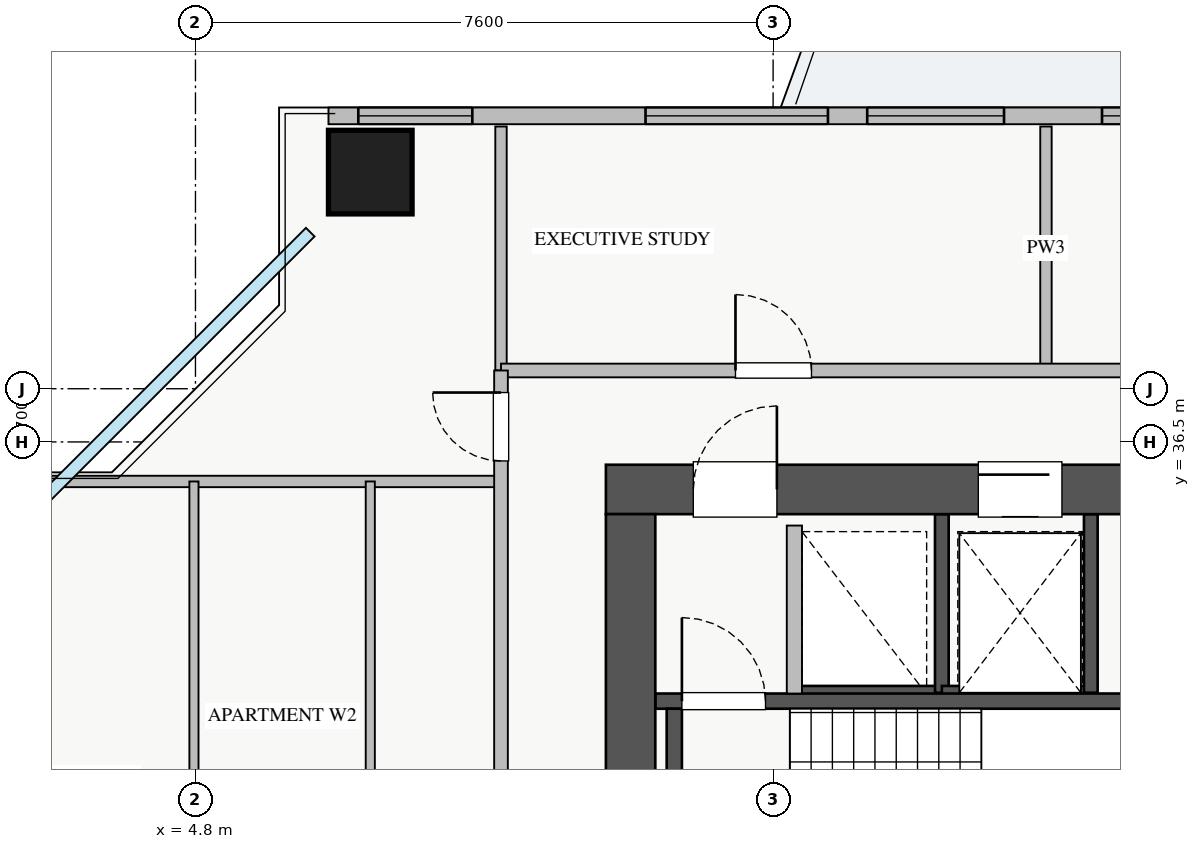
"""IFC4 building model, lengths in metres.
Left out: names, types, materials, properties, quantities, classifications, styles, units other than length and angle.
Written with IfcOpenShell. Run it as: python <this file> out.ifc"""

import sys

from ifc_helpers import new_model, si_unit, direction, frame, frame_2d, origin, origin_2d, place, context, subcontext, project, spatial, rectangle, extrude, source, transform, mapped, element, fill, save


model = new_model("IFC4")
c1 = context("Model", 3, precision=1e-05, world=origin(), true_north=direction((0.0, 1.0)))
c2 = subcontext(c1, "Body", "Model", "MODEL_VIEW")
j1 = project(units=[si_unit("LENGTHUNIT", "METRE"), si_unit("PLANEANGLEUNIT", "RADIAN")], contexts=[c1])
p1 = place(None, origin())
s1 = spatial("IfcSite", under=j1, at=p1, CompositionType="ELEMENT")
p2 = place(p1, origin())
s2 = spatial("IfcBuilding", under=s1, at=p2, CompositionType="ELEMENT")
p3 = place(p2, frame((0.0, 0.0, 136.0)))
s3 = spatial("IfcBuildingStorey", under=s2, at=p3, CompositionType="ELEMENT", Elevation=136.0)
p4 = place(p3, frame((12.68, 33.2, 0.0), z_axis=(0.0, 0.0, 1.0), x_axis=(1.0, 0.0, 0.0)))
e1 = element("IfcWall", 1, at=p4, inside=s3, PredefinedType="SHEAR", context=c2, shape_type="SweptSolid", body=[
    extrude(rectangle(XDim=1.94, YDim=0.18, at=frame_2d((0.97, 0.0))), origin(), (0.0, 0.0, 1.0), 3.03),
])
p5 = place(p3, frame((14.62, 33.2, 0.0), z_axis=(0.0, 0.0, 1.0), x_axis=(0.0, 1.0, 0.0)))
e2 = element("IfcWall", 2, at=p5, inside=s3, PredefinedType="SHEAR", context=c2, shape_type="SweptSolid", body=[
    extrude(rectangle(XDim=2.35, YDim=0.18, at=frame_2d((1.175, 0.0))), origin(), (0.0, 0.0, 1.0), 3.03),
])
p6 = place(p3, frame((14.62, 33.2, 0.0), z_axis=(0.0, 0.0, 1.0), x_axis=(1.0, 0.0, 0.0)))
e3 = element("IfcWall", 3, at=p6, inside=s3, PredefinedType="SHEAR", context=c2, shape_type="SweptSolid", body=[
    extrude(rectangle(XDim=1.96, YDim=0.18, at=frame_2d((0.98, 0.0))), origin(), (0.0, 0.0, 1.0), 3.03),
])
p7 = place(p3, frame((16.58, 33.2, 0.0), z_axis=(0.0, 0.0, 1.0), x_axis=(0.0, 1.0, 0.0)))
e4 = element("IfcWall", 4, at=p7, inside=s3, PredefinedType="SHEAR", context=c2, shape_type="SweptSolid", body=[
    extrude(rectangle(XDim=2.35, YDim=0.18, at=frame_2d((1.175, 0.0))), origin(), (0.0, 0.0, 1.0), 3.03),
])
p8 = place(p3, frame((10.85, 33.09, 0.0), z_axis=(0.0, 0.0, 1.0), x_axis=(1.0, 0.0, 0.0)))
e5 = element("IfcWall", 5, at=p8, inside=s3, PredefinedType="SHEAR", context=c2, shape_type="SweptSolid", body=[
    extrude(rectangle(XDim=7.3, YDim=0.2, at=frame_2d((3.65, 0.0))), origin(), (0.0, 0.0, 1.0), 3.25),
])
p9 = place(p8, frame((0.35, 0.0, 0.0)))
e6 = element("IfcOpeningElement", 6, at=p9, cuts=e5, PredefinedType="OPENING", context=c2, shape_type="SweptSolid", body=[
    extrude(rectangle(XDim=1.1, YDim=2.05, at=frame_2d((0.55, 1.025))), frame((0.0, 0.11, 0.0), z_axis=(0.0, -1.0, 0.0), x_axis=(1.0, 0.0, 0.0)), (0.0, 0.0, 1.0), 0.22),
])
p10 = place(p3, frame((11.1, 30.05, 0.0), z_axis=(0.0, 0.0, 1.0), x_axis=(0.0, 1.0, 0.0)))
e7 = element("IfcWall", 7, at=p10, inside=s3, PredefinedType="SHEAR", context=c2, shape_type="SweptSolid", body=[
    extrude(rectangle(XDim=2.94, YDim=0.2, at=frame_2d((1.47, 0.0))), origin(), (0.0, 0.0, 1.0), 3.25),
])
p11 = place(p3, frame((10.2, 35.875, 0.0), z_axis=(0.0, 0.0, 1.0), x_axis=(1.0, 0.0, 0.0)))
e8 = element("IfcWall", 8, at=p11, inside=s3, PredefinedType="SHEAR", context=c2, shape_type="SweptSolid", body=[
    extrude(rectangle(XDim=17.6, YDim=0.65, at=frame_2d((8.8, 0.0))), origin(), (0.0, 0.0, 1.0), 3.25),
])
p12 = place(p11, frame((1.15, 0.0, 0.0)))
e9 = element("IfcOpeningElement", 9, at=p12, cuts=e8, PredefinedType="OPENING", context=c2, shape_type="SweptSolid", body=[
    extrude(rectangle(XDim=1.1, YDim=2.05, at=frame_2d((0.55, 1.025))), frame((0.0, 0.335, 0.0), z_axis=(0.0, -1.0, 0.0), x_axis=(1.0, 0.0, 0.0)), (0.0, 0.0, 1.0), 0.67),
])
p13 = place(p11, frame((8.3, 0.0, 0.0)))
e10 = element("IfcOpeningElement", 10, at=p13, cuts=e8, PredefinedType="OPENING", context=c2, shape_type="SweptSolid", body=[
    extrude(rectangle(XDim=1.1, YDim=2.05, at=frame_2d((0.55, 1.025))), frame((0.0, 0.335, 0.0), z_axis=(0.0, -1.0, 0.0), x_axis=(1.0, 0.0, 0.0)), (0.0, 0.0, 1.0), 0.67),
])
p14 = place(p11, frame((4.9, 0.0, 0.0)))
e11 = element("IfcOpeningElement", 11, at=p14, cuts=e8, PredefinedType="OPENING", context=c2, shape_type="SweptSolid", body=[
    extrude(rectangle(XDim=1.1, YDim=2.05, at=frame_2d((0.55, 1.025))), frame((0.0, 0.335, 0.0), z_axis=(0.0, -1.0, 0.0), x_axis=(1.0, 0.0, 0.0)), (0.0, 0.0, 1.0), 0.67),
])
p15 = place(p11, frame((14.74, 0.0, 0.0)))
e12 = element("IfcOpeningElement", 12, at=p15, cuts=e8, PredefinedType="OPENING", context=c2, shape_type="SweptSolid", body=[
    extrude(rectangle(XDim=1.0, YDim=2.05, at=frame_2d((0.5, 1.025))), frame((0.0, 0.335, 0.0), z_axis=(0.0, -1.0, 0.0), x_axis=(1.0, 0.0, 0.0)), (0.0, 0.0, 1.0), 0.67),
])
p16 = place(p11, frame((10.175, 0.0, 0.0)))
e13 = element("IfcOpeningElement", 13, at=p16, cuts=e8, PredefinedType="OPENING", context=c2, shape_type="SweptSolid", body=[
    extrude(rectangle(XDim=1.0, YDim=2.05, at=frame_2d((0.5, 1.025))), frame((0.0, 0.335, 0.0), z_axis=(0.0, -1.0, 0.0), x_axis=(1.0, 0.0, 0.0)), (0.0, 0.0, 1.0), 0.67),
])
p17 = place(p11, frame((12.625, 0.0, 0.0)))
e14 = element("IfcOpeningElement", 14, at=p17, cuts=e8, PredefinedType="OPENING", context=c2, shape_type="SweptSolid", body=[
    extrude(rectangle(XDim=1.0, YDim=2.05, at=frame_2d((0.5, 1.025))), frame((0.0, 0.335, 0.0), z_axis=(0.0, -1.0, 0.0), x_axis=(1.0, 0.0, 0.0)), (0.0, 0.0, 1.0), 0.67),
])
p18 = place(p3, frame((10.525, 29.65, 0.0), z_axis=(0.0, 0.0, 1.0), x_axis=(0.0, 1.0, 0.0)))
e15 = element("IfcWall", 15, at=p18, inside=s3, PredefinedType="SHEAR", context=c2, shape_type="SweptSolid", body=[
    extrude(rectangle(XDim=5.9, YDim=0.65, at=frame_2d((2.95, 0.0))), origin(), (0.0, 0.0, 1.0), 3.25),
])
m1 = source(origin(), c2, "Body", "SweptSolid", [
    extrude(rectangle(XDim=1.1, YDim=1.1, at=origin_2d()), origin(), (0.0, 0.0, 1.0), 3.25),
])
p19 = place(p3, frame((7.1, 40.05, 0.0), z_axis=(0.0, 0.0, 1.0), x_axis=(1.0, 0.0, 0.0)))
e16 = element("IfcColumn", 16, at=p19, inside=s3, PredefinedType="COLUMN", context=c2, shape_type="MappedRepresentation", body=[
    mapped(m1, transform((0.0, 0.0, 0.0), x_axis=(1.0, 0.0, 0.0), y_axis=(0.0, 1.0, 0.0), z_axis=(0.0, 0.0, 1.0), scale=1.0)),
])
p20 = place(p3, frame((6.55, 40.79, 0.0), z_axis=(0.0, 0.0, 1.0), x_axis=(1.0, 0.0, 0.0)))
e17 = element("IfcWall", 17, at=p20, inside=s3, PredefinedType="STANDARD", context=c2, shape_type="SweptSolid", body=[
    extrude(rectangle(XDim=24.9, YDim=0.22, at=frame_2d((12.45, 0.0))), origin(), (0.0, 0.0, 1.0), 2.57),
])
p21 = place(p20, frame((13.3, 0.0, 0.0)))
e18 = element("IfcOpeningElement", 18, at=p21, cuts=e17, PredefinedType="OPENING", context=c2, shape_type="SweptSolid", body=[
    extrude(rectangle(XDim=1.2, YDim=2.1, at=frame_2d((0.6, 1.05))), frame((0.0, 0.12, 0.0), z_axis=(0.0, -1.0, 0.0), x_axis=(1.0, 0.0, 0.0)), (0.0, 0.0, 1.0), 0.24),
])
p22 = place(p20, frame((0.393, 0.0, 0.9)))
e19 = element("IfcOpeningElement", 19, at=p22, cuts=e17, PredefinedType="OPENING", context=c2, shape_type="SweptSolid", body=[
    extrude(rectangle(XDim=1.5, YDim=1.5, at=frame_2d((0.75, 0.75))), frame((0.0, 0.12, 0.0), z_axis=(0.0, -1.0, 0.0), x_axis=(1.0, 0.0, 0.0)), (0.0, 0.0, 1.0), 0.24),
])
p23 = place(p20, frame((7.088, 0.0, 0.9)))
e20 = element("IfcOpeningElement", 20, at=p23, cuts=e17, PredefinedType="OPENING", context=c2, shape_type="SweptSolid", body=[
    extrude(rectangle(XDim=1.8, YDim=1.5, at=frame_2d((0.9, 0.75))), frame((0.0, 0.12, 0.0), z_axis=(0.0, -1.0, 0.0), x_axis=(1.0, 0.0, 0.0)), (0.0, 0.0, 1.0), 0.24),
])
p24 = place(p20, frame((14.813, 0.0, 0.9)))
e21 = element("IfcOpeningElement", 21, at=p24, cuts=e17, PredefinedType="OPENING", context=c2, shape_type="SweptSolid", body=[
    extrude(rectangle(XDim=1.5, YDim=1.45, at=frame_2d((0.75, 0.725))), frame((0.0, 0.12, 0.0), z_axis=(0.0, -1.0, 0.0), x_axis=(1.0, 0.0, 0.0)), (0.0, 0.0, 1.0), 0.24),
])
p25 = place(p20, frame((20.738, 0.0, 0.9)))
e22 = element("IfcOpeningElement", 22, at=p25, cuts=e17, PredefinedType="OPENING", context=c2, shape_type="SweptSolid", body=[
    extrude(rectangle(XDim=2.1, YDim=1.48, at=frame_2d((1.05, 0.74))), frame((0.0, 0.12, 0.0), z_axis=(0.0, -1.0, 0.0), x_axis=(1.0, 0.0, 0.0)), (0.0, 0.0, 1.0), 0.24),
])
p26 = place(p20, frame((4.171, 0.0, 0.9)))
e23 = element("IfcOpeningElement", 23, at=p26, cuts=e17, PredefinedType="OPENING", context=c2, shape_type="SweptSolid", body=[
    extrude(rectangle(XDim=2.4, YDim=1.5, at=frame_2d((1.2, 0.75))), frame((0.0, 0.12, 0.0), z_axis=(0.0, -1.0, 0.0), x_axis=(1.0, 0.0, 0.0)), (0.0, 0.0, 1.0), 0.24),
])
p27 = place(p20, frame((10.177, 0.0, 0.9)))
e24 = element("IfcOpeningElement", 24, at=p27, cuts=e17, PredefinedType="OPENING", context=c2, shape_type="SweptSolid", body=[
    extrude(rectangle(XDim=2.4, YDim=1.5, at=frame_2d((1.2, 0.75))), frame((0.0, 0.12, 0.0), z_axis=(0.0, -1.0, 0.0), x_axis=(1.0, 0.0, 0.0)), (0.0, 0.0, 1.0), 0.24),
])
p28 = place(p3, frame((12.68, 33.19, 0.0), z_axis=(0.0, 0.0, 1.0), x_axis=(0.0, 1.0, 0.0)))
e25 = element("IfcWall", 25, at=p28, inside=s3, PredefinedType="PARTITIONING", context=c2, shape_type="SweptSolid", body=[
    extrude(rectangle(XDim=2.21, YDim=0.2, at=frame_2d((1.105, 0.0))), origin(), (0.0, 0.0, 1.0), 3.03),
])
p29 = place(p3, frame((15.99, 37.44, 0.0), z_axis=(0.0, 0.0, 1.0), x_axis=(0.0, 1.0, 0.0)))
e26 = element("IfcWall", 26, at=p29, inside=s3, PredefinedType="PARTITIONING", context=c2, shape_type="SweptSolid", body=[
    extrude(rectangle(XDim=3.21, YDim=0.15, at=frame_2d((1.605, 0.0))), origin(), (0.0, 0.0, 1.0), 2.775),
])
p30 = place(p3, frame((8.82, 37.44, 0.0), z_axis=(0.0, 0.0, 1.0), x_axis=(0.0, 1.0, 0.0)))
e27 = element("IfcWall", 27, at=p30, inside=s3, PredefinedType="PARTITIONING", context=c2, shape_type="SweptSolid", body=[
    extrude(rectangle(XDim=3.21, YDim=0.15, at=frame_2d((1.605, 0.0))), origin(), (0.0, 0.0, 1.0), 3.03),
])
p31 = place(p3, frame((8.82, 37.44, 0.0), z_axis=(0.0, 0.0, 1.0), x_axis=(1.0, 0.0, 0.0)))
e28 = element("IfcWall", 28, at=p31, inside=s3, PredefinedType="PARTITIONING", context=c2, shape_type="SweptSolid", body=[
    extrude(rectangle(XDim=23.58, YDim=0.18, at=frame_2d((11.79, 0.0))), origin(), (0.0, 0.0, 1.0), 3.03),
])
p32 = place(p31, frame((3.085, 0.0, 0.0)))
e29 = element("IfcOpeningElement", 29, at=p32, cuts=e28, PredefinedType="OPENING", context=c2, shape_type="SweptSolid", body=[
    extrude(rectangle(XDim=1.0, YDim=2.05, at=frame_2d((0.5, 1.025))), frame((0.0, 0.1, 0.0), z_axis=(0.0, -1.0, 0.0), x_axis=(1.0, 0.0, 0.0)), (0.0, 0.0, 1.0), 0.2),
])
p33 = place(p31, frame((10.805, 0.0, 0.0)))
e30 = element("IfcOpeningElement", 30, at=p33, cuts=e28, PredefinedType="OPENING", context=c2, shape_type="SweptSolid", body=[
    extrude(rectangle(XDim=1.0, YDim=2.05, at=frame_2d((0.5, 1.025))), frame((0.0, 0.1, 0.0), z_axis=(0.0, -1.0, 0.0), x_axis=(1.0, 0.0, 0.0)), (0.0, 0.0, 1.0), 0.2),
])
p34 = place(p31, frame((18.8, 0.0, 0.0)))
e31 = element("IfcOpeningElement", 31, at=p34, cuts=e28, PredefinedType="OPENING", context=c2, shape_type="SweptSolid", body=[
    extrude(rectangle(XDim=1.0, YDim=2.05, at=frame_2d((0.5, 1.025))), frame((0.0, 0.1, 0.0), z_axis=(0.0, -1.0, 0.0), x_axis=(1.0, 0.0, 0.0)), (0.0, 0.0, 1.0), 0.2),
])
p35 = place(p3, frame((1.35, 35.98, 0.0), z_axis=(0.0, 0.0, 1.0), x_axis=(1.0, 0.0, 0.0)))
e32 = element("IfcWall", 32, at=p35, inside=s3, PredefinedType="PARTITIONING", context=c2, shape_type="SweptSolid", body=[
    extrude(rectangle(XDim=7.47, YDim=0.15, at=frame_2d((3.735, 0.0))), origin(), (0.0, 0.0, 1.0), 3.03),
])
p36 = place(p3, frame((4.78, 28.79, 0.0), z_axis=(0.0, 0.0, 1.0), x_axis=(0.0, 1.0, 0.0)))
e33 = element("IfcWall", 33, at=p36, inside=s3, PredefinedType="PLUMBINGWALL", context=c2, shape_type="SweptSolid", body=[
    extrude(rectangle(XDim=7.19, YDim=0.12, at=frame_2d((3.595, 0.0))), origin(), (0.0, 0.0, 1.0), 3.03),
])
p37 = place(p3, frame((7.1, 28.79, 0.0), z_axis=(0.0, 0.0, 1.0), x_axis=(0.0, 1.0, 0.0)))
e34 = element("IfcWall", 34, at=p37, inside=s3, PredefinedType="PLUMBINGWALL", context=c2, shape_type="SweptSolid", body=[
    extrude(rectangle(XDim=7.19, YDim=0.12, at=frame_2d((3.595, 0.0))), origin(), (0.0, 0.0, 1.0), 2.537),
])
p38 = place(p3, frame((8.82, 8.31, 0.0), z_axis=(0.0, 0.0, 1.0), x_axis=(0.0, 1.0, 0.0)))
e35 = element("IfcWall", 35, at=p38, inside=s3, PredefinedType="PARTITIONING", context=c2, shape_type="SweptSolid", body=[
    extrude(rectangle(XDim=29.13, YDim=0.18, at=frame_2d((14.565, 0.0))), origin(), (0.0, 0.0, 1.0), 3.03),
])
p39 = place(p38, frame((27.94, 0.0, 0.0)))
e36 = element("IfcOpeningElement", 36, at=p39, cuts=e35, PredefinedType="OPENING", context=c2, shape_type="SweptSolid", body=[
    extrude(rectangle(XDim=0.9, YDim=2.05, at=frame_2d((0.45, 1.025))), frame((0.0, 0.1, 0.0), z_axis=(0.0, -1.0, 0.0), x_axis=(1.0, 0.0, 0.0)), (0.0, 0.0, 1.0), 0.2),
])
p40 = place(p38, frame((0.24, 0.0, 0.0)))
e37 = element("IfcOpeningElement", 37, at=p40, cuts=e35, PredefinedType="OPENING", context=c2, shape_type="SweptSolid", body=[
    extrude(rectangle(XDim=0.9, YDim=2.05, at=frame_2d((0.45, 1.025))), frame((0.0, 0.1, 0.0), z_axis=(0.0, -1.0, 0.0), x_axis=(1.0, 0.0, 0.0)), (0.0, 0.0, 1.0), 0.2),
])
p41 = place(p38, frame((7.105, 0.0, 0.0)))
e38 = element("IfcOpeningElement", 38, at=p41, cuts=e35, PredefinedType="OPENING", context=c2, shape_type="SweptSolid", body=[
    extrude(rectangle(XDim=1.0, YDim=2.05, at=frame_2d((0.5, 1.025))), frame((0.0, 0.1, 0.0), z_axis=(0.0, -1.0, 0.0), x_axis=(1.0, 0.0, 0.0)), (0.0, 0.0, 1.0), 0.2),
])
p42 = place(p38, frame((16.475, 0.0, 0.0)))
e39 = element("IfcOpeningElement", 39, at=p42, cuts=e35, PredefinedType="OPENING", context=c2, shape_type="SweptSolid", body=[
    extrude(rectangle(XDim=1.0, YDim=2.05, at=frame_2d((0.5, 1.025))), frame((0.0, 0.1, 0.0), z_axis=(0.0, -1.0, 0.0), x_axis=(1.0, 0.0, 0.0)), (0.0, 0.0, 1.0), 0.2),
])
m2 = source(origin(), c2, "Body", "SweptSolid", [
    extrude(rectangle(XDim=1.5, YDim=1.5, at=frame_2d((0.75, 0.75))), frame((0.0, 0.03, 0.0), z_axis=(0.0, -1.0, 0.0), x_axis=(1.0, 0.0, 0.0)), (0.0, 0.0, 1.0), 0.06),
])
p43 = place(p22, origin())
e40 = element("IfcWindow", 40, at=p43, inside=s3, PartitioningType="TRIPLE_PANEL_VERTICAL", PredefinedType="WINDOW", context=c2, shape_type="MappedRepresentation", body=[
    mapped(m2, transform((0.0, 0.0, 0.0), x_axis=(1.0, 0.0, 0.0), y_axis=(0.0, 1.0, 0.0), z_axis=(0.0, 0.0, 1.0), scale=1.0)),
])
fill(e19, e40)
m3 = source(origin(), c2, "Body", "SweptSolid", [
    extrude(rectangle(XDim=1.8, YDim=1.5, at=frame_2d((0.9, 0.75))), frame((0.0, 0.03, 0.0), z_axis=(0.0, -1.0, 0.0), x_axis=(1.0, 0.0, 0.0)), (0.0, 0.0, 1.0), 0.06),
])
p44 = place(p23, origin())
e41 = element("IfcWindow", 41, at=p44, inside=s3, PartitioningType="DOUBLE_PANEL_VERTICAL", PredefinedType="WINDOW", context=c2, shape_type="MappedRepresentation", body=[
    mapped(m3, transform((0.0, 0.0, 0.0), x_axis=(1.0, 0.0, 0.0), y_axis=(0.0, 1.0, 0.0), z_axis=(0.0, 0.0, 1.0), scale=1.0)),
])
fill(e20, e41)
m4 = source(origin(), c2, "Body", "SweptSolid", [
    extrude(rectangle(XDim=1.1, YDim=2.05, at=frame_2d((0.55, 1.025))), frame((0.0, 0.025, 0.0), z_axis=(0.0, -1.0, 0.0), x_axis=(1.0, 0.0, 0.0)), (0.0, 0.0, 1.0), 0.05),
])
p45 = place(p12, origin())
e42 = element("IfcDoor", 42, at=p45, inside=s3, OperationType="SINGLE_SWING_RIGHT", PredefinedType="DOOR", context=c2, shape_type="MappedRepresentation", body=[
    mapped(m4, transform((0.0, 0.0, 0.0), x_axis=(1.0, 0.0, 0.0), y_axis=(0.0, 1.0, 0.0), z_axis=(0.0, 0.0, 1.0), scale=1.0)),
])
fill(e9, e42)
p46 = place(p9, origin())
e43 = element("IfcDoor", 43, at=p46, inside=s3, OperationType="SINGLE_SWING_LEFT", PredefinedType="DOOR", context=c2, shape_type="MappedRepresentation", body=[
    mapped(m4, transform((0.0, 0.0, 0.0), x_axis=(1.0, 0.0, 0.0), y_axis=(0.0, 1.0, 0.0), z_axis=(0.0, 0.0, 1.0), scale=1.0)),
])
fill(e6, e43)
p47 = place(p14, origin())
e44 = element("IfcDoor", 44, at=p47, inside=s3, OperationType="SLIDING_TO_LEFT", PredefinedType="DOOR", context=c2, shape_type="MappedRepresentation", body=[
    mapped(m4, transform((0.0, 0.0, 0.0), x_axis=(1.0, 0.0, 0.0), y_axis=(0.0, 1.0, 0.0), z_axis=(0.0, 0.0, 1.0), scale=1.0)),
])
fill(e11, e44)
m5 = source(origin(), c2, "Body", "SweptSolid", [
    extrude(rectangle(XDim=1.0, YDim=2.05, at=frame_2d((0.5, 1.025))), frame((0.0, 0.025, 0.0), z_axis=(0.0, -1.0, 0.0), x_axis=(1.0, 0.0, 0.0)), (0.0, 0.0, 1.0), 0.05),
])
p48 = place(p32, origin())
e45 = element("IfcDoor", 45, at=p48, inside=s3, OperationType="SINGLE_SWING_LEFT", PredefinedType="DOOR", context=c2, shape_type="MappedRepresentation", body=[
    mapped(m5, transform((0.0, 0.0, 0.0), x_axis=(1.0, 0.0, 0.0), y_axis=(0.0, 1.0, 0.0), z_axis=(0.0, 0.0, 1.0), scale=1.0)),
])
fill(e29, e45)
m6 = source(origin(), c2, "Body", "SweptSolid", [
    extrude(rectangle(XDim=0.9, YDim=2.05, at=frame_2d((0.45, 1.025))), frame((0.0, 0.025, 0.0), z_axis=(0.0, -1.0, 0.0), x_axis=(1.0, 0.0, 0.0)), (0.0, 0.0, 1.0), 0.05),
])
p49 = place(p39, origin())
e46 = element("IfcDoor", 46, at=p49, inside=s3, OperationType="SINGLE_SWING_RIGHT", PredefinedType="DOOR", context=c2, shape_type="MappedRepresentation", body=[
    mapped(m6, transform((0.0, 0.0, 0.0), x_axis=(1.0, 0.0, 0.0), y_axis=(0.0, 1.0, 0.0), z_axis=(0.0, 0.0, 1.0), scale=1.0)),
])
fill(e36, e46)
m7 = source(origin(), c2, "Body", "SweptSolid", [
    extrude(rectangle(XDim=2.4, YDim=1.5, at=frame_2d((1.2, 0.75))), frame((0.0, 0.03, 0.0), z_axis=(0.0, -1.0, 0.0), x_axis=(1.0, 0.0, 0.0)), (0.0, 0.0, 1.0), 0.06),
])
p50 = place(p26, origin())
e47 = element("IfcWindow", 47, at=p50, inside=s3, PartitioningType="TRIPLE_PANEL_VERTICAL", PredefinedType="WINDOW", context=c2, shape_type="MappedRepresentation", body=[
    mapped(m7, transform((0.0, 0.0, 0.0), x_axis=(1.0, 0.0, 0.0), y_axis=(0.0, 1.0, 0.0), z_axis=(0.0, 0.0, 1.0), scale=1.0)),
])
fill(e23, e47)
p51 = place(p27, origin())
e48 = element("IfcWindow", 48, at=p51, inside=s3, PartitioningType="TRIPLE_PANEL_VERTICAL", PredefinedType="WINDOW", context=c2, shape_type="MappedRepresentation", body=[
    mapped(m7, transform((0.0, 0.0, 0.0), x_axis=(1.0, 0.0, 0.0), y_axis=(0.0, 1.0, 0.0), z_axis=(0.0, 0.0, 1.0), scale=1.0)),
])
fill(e24, e48)
save(model, sys.argv[1])
